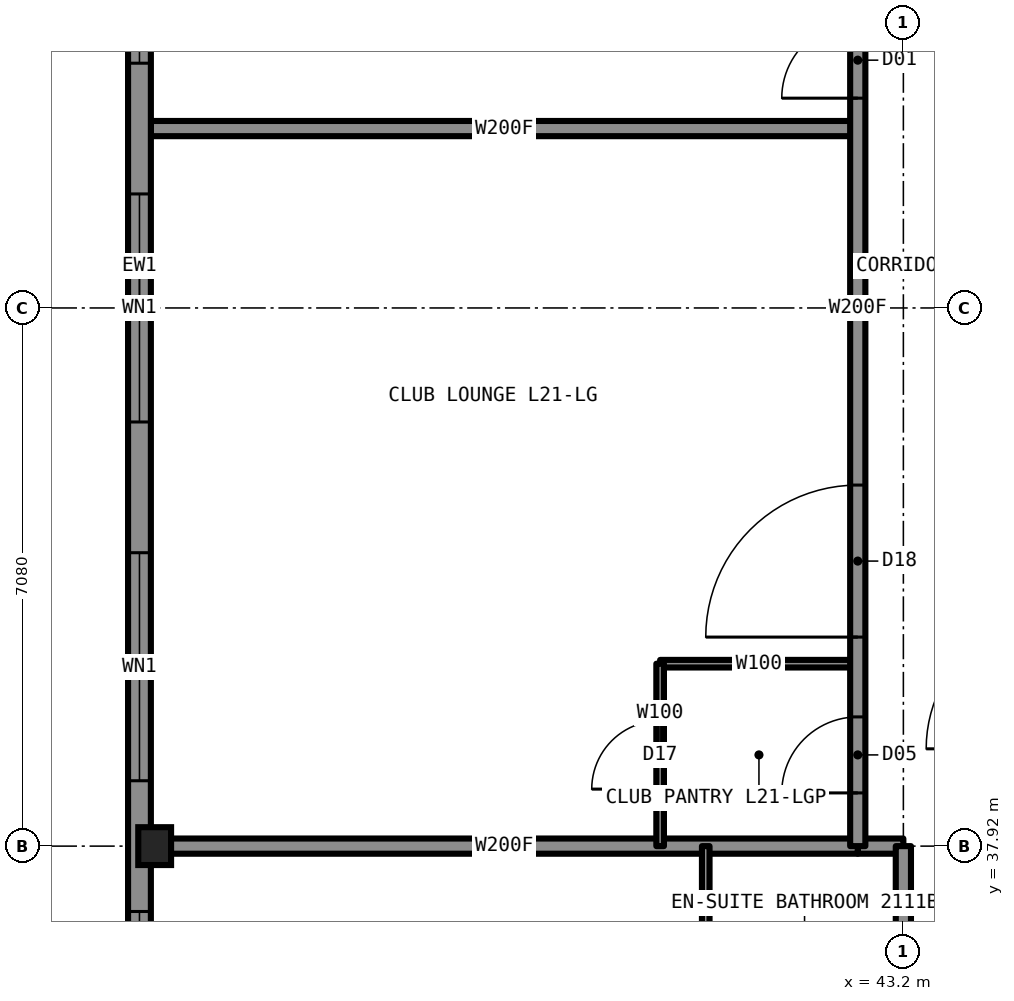
"""IFC4 building model, lengths in metres.
Left out: names, types, materials, properties, quantities, classifications, styles, units other than length and angle.
Written with IfcOpenShell. Run it as: python <this file> out.ifc"""

import sys

from ifc_helpers import new_model, si_unit, direction, frame, frame_2d, origin, origin_2d, place, context, subcontext, project, spatial, rectangle, i_section, extrude, element, fill, save


model = new_model("IFC4")
c1 = context("Model", 3, precision=1e-05, world=origin(), true_north=direction((0.0, 1.0)))
c2 = subcontext(c1, "Body", "Model", "MODEL_VIEW")
j1 = project(units=[si_unit("LENGTHUNIT", "METRE"), si_unit("PLANEANGLEUNIT", "RADIAN")], contexts=[c1])
p1 = place(None, origin())
s1 = spatial("IfcSite", under=j1, at=p1, CompositionType="ELEMENT")
p2 = place(p1, origin())
s2 = spatial("IfcBuilding", under=s1, at=p2, CompositionType="ELEMENT")
p3 = place(p2, frame((0.0, 0.0, 81.0)))
s3 = spatial("IfcBuildingStorey", under=s2, at=p3, CompositionType="ELEMENT", Elevation=81.0)
p4 = place(p3, frame((33.35, 37.92, 0.0), z_axis=(0.0, 0.0, 1.0), x_axis=(1.0, 0.0, 0.0)))
e1 = element("IfcColumn", 1, at=p4, inside=s3, PredefinedType="COLUMN", context=c2, shape_type="SweptSolid", body=[
    extrude(i_section(OverallWidth=0.432, OverallDepth=0.498, WebThickness=0.056, FlangeThickness=0.089, at=origin_2d()), origin(), (0.0, 0.0, 1.0), 3.5),
])
p5 = place(p3, frame((40.0, 40.32, 0.0), z_axis=(0.0, 0.0, 1.0), x_axis=(1.0, 0.0, 0.0)))
e2 = element("IfcWall", 2, at=p5, inside=s3, PredefinedType="PARTITIONING", context=c2, shape_type="SweptSolid", body=[
    extrude(rectangle(XDim=2.6, YDim=0.1, at=frame_2d((1.3, 0.0))), origin(), (0.0, 0.0, 1.0), 2.723),
])
p6 = place(p3, frame((42.6, 37.92, 0.0), z_axis=(0.0, 0.0, 1.0), x_axis=(1.0, 0.0, 0.0)))
e3 = element("IfcWall", 3, at=p6, inside=s3, PredefinedType="PARTITIONING", context=c2, shape_type="SweptSolid", body=[
    extrude(rectangle(XDim=0.6, YDim=0.2, at=frame_2d((0.3, 0.0))), origin(), (0.0, 0.0, 1.0), 2.573),
])
p7 = place(p3, frame((33.3, 37.92, 0.0), z_axis=(0.0, 0.0, 1.0), x_axis=(1.0, 0.0, 0.0)))
e4 = element("IfcWall", 4, at=p7, inside=s3, PredefinedType="PARTITIONING", context=c2, shape_type="SweptSolid", body=[
    extrude(rectangle(XDim=9.3, YDim=0.2, at=frame_2d((4.65, 0.0))), origin(), (0.0, 0.0, 1.0), 2.573),
])
p8 = place(p3, frame((33.3, 47.36, 0.0), z_axis=(0.0, 0.0, 1.0), x_axis=(1.0, 0.0, 0.0)))
e5 = element("IfcWall", 5, at=p8, inside=s3, PredefinedType="PARTITIONING", context=c2, shape_type="SweptSolid", body=[
    extrude(rectangle(XDim=9.3, YDim=0.2, at=frame_2d((4.65, 0.0))), origin(), (0.0, 0.0, 1.0), 2.723),
])
p9 = place(p3, frame((43.2, 33.2, 0.0), z_axis=(0.0, 0.0, 1.0), x_axis=(0.0, 1.0, 0.0)))
e6 = element("IfcWall", 6, at=p9, inside=s3, PredefinedType="PARTITIONING", context=c2, shape_type="SweptSolid", body=[
    extrude(rectangle(XDim=4.72, YDim=0.2, at=frame_2d((2.36, 0.0))), origin(), (0.0, 0.0, 1.0), 3.33),
])
p10 = place(p9, frame((0.66, 0.0, 0.0)))
e7 = element("IfcOpeningElement", 7, at=p10, cuts=e6, PredefinedType="OPENING", context=c2, shape_type="SweptSolid", body=[
    extrude(rectangle(XDim=1.1, YDim=2.2, at=frame_2d((0.55, 1.1))), frame((0.0, 0.11, 0.0), z_axis=(0.0, -1.0, 0.0), x_axis=(1.0, 0.0, 0.0)), (0.0, 0.0, 1.0), 0.22),
])
p11 = place(p3, frame((42.6, 37.92, 0.0), z_axis=(0.0, 0.0, 1.0), x_axis=(0.0, 1.0, 0.0)))
e8 = element("IfcWall", 8, at=p11, inside=s3, PredefinedType="PARTITIONING", context=c2, shape_type="SweptSolid", body=[
    extrude(rectangle(XDim=14.16, YDim=0.2, at=frame_2d((7.08, 0.0))), origin(), (0.0, 0.0, 1.0), 3.33),
])
p12 = place(p11, frame((9.84, 0.0, 0.0)))
e9 = element("IfcOpeningElement", 9, at=p12, cuts=e8, PredefinedType="OPENING", context=c2, shape_type="SweptSolid", body=[
    extrude(rectangle(XDim=1.0, YDim=2.2, at=frame_2d((0.5, 1.1))), frame((0.0, 0.11, 0.0), z_axis=(0.0, -1.0, 0.0), x_axis=(1.0, 0.0, 0.0)), (0.0, 0.0, 1.0), 0.22),
])
p13 = place(p11, frame((2.75, 0.0, 0.0)))
e10 = element("IfcOpeningElement", 10, at=p13, cuts=e8, PredefinedType="OPENING", context=c2, shape_type="SweptSolid", body=[
    extrude(rectangle(XDim=2.0, YDim=2.4, at=frame_2d((1.0, 1.2))), frame((0.0, 0.11, 0.0), z_axis=(0.0, -1.0, 0.0), x_axis=(1.0, 0.0, 0.0)), (0.0, 0.0, 1.0), 0.22),
])
p14 = place(p11, frame((0.7, 0.0, 0.0)))
e11 = element("IfcOpeningElement", 11, at=p14, cuts=e8, PredefinedType="OPENING", context=c2, shape_type="SweptSolid", body=[
    extrude(rectangle(XDim=1.0, YDim=2.1, at=frame_2d((0.5, 1.05))), frame((0.0, 0.11, 0.0), z_axis=(0.0, -1.0, 0.0), x_axis=(1.0, 0.0, 0.0)), (0.0, 0.0, 1.0), 0.22),
])
p15 = place(p3, frame((40.6, 35.32, 0.0), z_axis=(0.0, 0.0, 1.0), x_axis=(0.0, 1.0, 0.0)))
e12 = element("IfcWall", 12, at=p15, inside=s3, PredefinedType="PARTITIONING", context=c2, shape_type="SweptSolid", body=[
    extrude(rectangle(XDim=2.6, YDim=0.1, at=frame_2d((1.3, 0.0))), origin(), (0.0, 0.0, 1.0), 3.33),
])
p16 = place(p3, frame((40.0, 37.92, 0.0), z_axis=(0.0, 0.0, 1.0), x_axis=(0.0, 1.0, 0.0)))
e13 = element("IfcWall", 13, at=p16, inside=s3, PredefinedType="PARTITIONING", context=c2, shape_type="SweptSolid", body=[
    extrude(rectangle(XDim=2.4, YDim=0.1, at=frame_2d((1.2, 0.0))), origin(), (0.0, 0.0, 1.0), 3.33),
])
p17 = place(p16, frame((0.75, 0.0, 0.0)))
e14 = element("IfcOpeningElement", 14, at=p17, cuts=e13, PredefinedType="OPENING", context=c2, shape_type="SweptSolid", body=[
    extrude(rectangle(XDim=0.9, YDim=2.2, at=frame_2d((0.45, 1.1))), frame((0.0, 0.06, 0.0), z_axis=(0.0, -1.0, 0.0), x_axis=(1.0, 0.0, 0.0)), (0.0, 0.0, 1.0), 0.12),
])
p18 = place(p3, frame((33.15, 61.5, 0.0), z_axis=(0.0, 0.0, 1.0), x_axis=(0.0, -1.0, 0.0)))
e15 = element("IfcWall", 15, at=p18, inside=s3, PredefinedType="SOLIDWALL", context=c2, shape_type="SweptSolid", body=[
    extrude(rectangle(XDim=33.0, YDim=0.3, at=frame_2d((16.5, 0.0))), origin(), (0.0, 0.0, 1.0), 2.63),
])
p19 = place(p18, frame((0.85, 0.0, 0.5)))
e16 = element("IfcOpeningElement", 16, at=p19, cuts=e15, PredefinedType="OPENING", context=c2, shape_type="SweptSolid", body=[
    extrude(rectangle(XDim=3.0, YDim=2.0, at=frame_2d((1.5, 1.0))), frame((0.0, 0.16, 0.0), z_axis=(0.0, -1.0, 0.0), x_axis=(1.0, 0.0, 0.0)), (0.0, 0.0, 1.0), 0.32),
])
p20 = place(p18, frame((5.56, 0.0, 0.5)))
e17 = element("IfcOpeningElement", 17, at=p20, cuts=e15, PredefinedType="OPENING", context=c2, shape_type="SweptSolid", body=[
    extrude(rectangle(XDim=3.0, YDim=2.0, at=frame_2d((1.5, 1.0))), frame((0.0, 0.16, 0.0), z_axis=(0.0, -1.0, 0.0), x_axis=(1.0, 0.0, 0.0)), (0.0, 0.0, 1.0), 0.32),
])
p21 = place(p18, frame((10.28, 0.0, 0.5)))
e18 = element("IfcOpeningElement", 18, at=p21, cuts=e15, PredefinedType="OPENING", context=c2, shape_type="SweptSolid", body=[
    extrude(rectangle(XDim=3.0, YDim=2.0, at=frame_2d((1.5, 1.0))), frame((0.0, 0.16, 0.0), z_axis=(0.0, -1.0, 0.0), x_axis=(1.0, 0.0, 0.0)), (0.0, 0.0, 1.0), 0.32),
])
p22 = place(p18, frame((15.0, 0.0, 0.5)))
e19 = element("IfcOpeningElement", 19, at=p22, cuts=e15, PredefinedType="OPENING", context=c2, shape_type="SweptSolid", body=[
    extrude(rectangle(XDim=3.0, YDim=2.0, at=frame_2d((1.5, 1.0))), frame((0.0, 0.16, 0.0), z_axis=(0.0, -1.0, 0.0), x_axis=(1.0, 0.0, 0.0)), (0.0, 0.0, 1.0), 0.32),
])
p23 = place(p18, frame((19.72, 0.0, 0.5)))
e20 = element("IfcOpeningElement", 20, at=p23, cuts=e15, PredefinedType="OPENING", context=c2, shape_type="SweptSolid", body=[
    extrude(rectangle(XDim=3.0, YDim=2.0, at=frame_2d((1.5, 1.0))), frame((0.0, 0.16, 0.0), z_axis=(0.0, -1.0, 0.0), x_axis=(1.0, 0.0, 0.0)), (0.0, 0.0, 1.0), 0.32),
])
p24 = place(p18, frame((24.44, 0.0, 0.5)))
e21 = element("IfcOpeningElement", 21, at=p24, cuts=e15, PredefinedType="OPENING", context=c2, shape_type="SweptSolid", body=[
    extrude(rectangle(XDim=3.0, YDim=2.0, at=frame_2d((1.5, 1.0))), frame((0.0, 0.16, 0.0), z_axis=(0.0, -1.0, 0.0), x_axis=(1.0, 0.0, 0.0)), (0.0, 0.0, 1.0), 0.32),
])
p25 = place(p18, frame((29.15, 0.0, 0.5)))
e22 = element("IfcOpeningElement", 22, at=p25, cuts=e15, PredefinedType="OPENING", context=c2, shape_type="SweptSolid", body=[
    extrude(rectangle(XDim=3.0, YDim=2.0, at=frame_2d((1.5, 1.0))), frame((0.0, 0.16, 0.0), z_axis=(0.0, -1.0, 0.0), x_axis=(1.0, 0.0, 0.0)), (0.0, 0.0, 1.0), 0.32),
])
p26 = place(p12, origin())
e23 = element("IfcDoor", 23, at=p26, inside=s3, OperationType="SINGLE_SWING_LEFT", PredefinedType="DOOR", context=c2, shape_type="SweptSolid", body=[
    extrude(rectangle(XDim=1.0, YDim=2.2, at=frame_2d((0.5, 1.1))), frame((0.0, 0.025, 0.0), z_axis=(0.0, -1.0, 0.0), x_axis=(1.0, 0.0, 0.0)), (0.0, 0.0, 1.0), 0.05),
])
fill(e9, e23)
p27 = place(p13, origin())
e24 = element("IfcDoor", 24, at=p27, inside=s3, OperationType="DOUBLE_DOOR_SINGLE_SWING", PredefinedType="DOOR", context=c2, shape_type="SweptSolid", body=[
    extrude(rectangle(XDim=2.0, YDim=2.4, at=frame_2d((1.0, 1.2))), frame((0.0, 0.025, 0.0), z_axis=(0.0, -1.0, 0.0), x_axis=(1.0, 0.0, 0.0)), (0.0, 0.0, 1.0), 0.05),
])
fill(e10, e24)
p28 = place(p17, origin())
e25 = element("IfcDoor", 25, at=p28, inside=s3, OperationType="SINGLE_SWING_LEFT", PredefinedType="DOOR", context=c2, shape_type="SweptSolid", body=[
    extrude(rectangle(XDim=0.9, YDim=2.2, at=frame_2d((0.45, 1.1))), frame((0.0, 0.025, 0.0), z_axis=(0.0, -1.0, 0.0), x_axis=(1.0, 0.0, 0.0)), (0.0, 0.0, 1.0), 0.05),
])
fill(e14, e25)
p29 = place(p14, origin())
e26 = element("IfcDoor", 26, at=p29, inside=s3, OperationType="SINGLE_SWING_LEFT", PredefinedType="DOOR", context=c2, shape_type="SweptSolid", body=[
    extrude(rectangle(XDim=1.0, YDim=2.1, at=frame_2d((0.5, 1.05))), frame((0.0, 0.025, 0.0), z_axis=(0.0, -1.0, 0.0), x_axis=(1.0, 0.0, 0.0)), (0.0, 0.0, 1.0), 0.05),
])
fill(e11, e26)
p30 = place(p21, origin())
e27 = element("IfcWindow", 27, at=p30, inside=s3, PartitioningType="SINGLE_PANEL", PredefinedType="WINDOW", context=c2, shape_type="SweptSolid", body=[
    extrude(rectangle(XDim=3.0, YDim=2.0, at=frame_2d((1.5, 1.0))), frame((0.0, 0.03, 0.0), z_axis=(0.0, -1.0, 0.0), x_axis=(1.0, 0.0, 0.0)), (0.0, 0.0, 1.0), 0.06),
])
fill(e18, e27)
p31 = place(p22, origin())
e28 = element("IfcWindow", 28, at=p31, inside=s3, PartitioningType="SINGLE_PANEL", PredefinedType="WINDOW", context=c2, shape_type="SweptSolid", body=[
    extrude(rectangle(XDim=3.0, YDim=2.0, at=frame_2d((1.5, 1.0))), frame((0.0, 0.03, 0.0), z_axis=(0.0, -1.0, 0.0), x_axis=(1.0, 0.0, 0.0)), (0.0, 0.0, 1.0), 0.06),
])
fill(e19, e28)
p32 = place(p23, origin())
e29 = element("IfcWindow", 29, at=p32, inside=s3, PartitioningType="SINGLE_PANEL", PredefinedType="WINDOW", context=c2, shape_type="SweptSolid", body=[
    extrude(rectangle(XDim=3.0, YDim=2.0, at=frame_2d((1.5, 1.0))), frame((0.0, 0.03, 0.0), z_axis=(0.0, -1.0, 0.0), x_axis=(1.0, 0.0, 0.0)), (0.0, 0.0, 1.0), 0.06),
])
fill(e20, e29)
p33 = place(p24, origin())
e30 = element("IfcWindow", 30, at=p33, inside=s3, PartitioningType="SINGLE_PANEL", PredefinedType="WINDOW", context=c2, shape_type="SweptSolid", body=[
    extrude(rectangle(XDim=3.0, YDim=2.0, at=frame_2d((1.5, 1.0))), frame((0.0, 0.03, 0.0), z_axis=(0.0, -1.0, 0.0), x_axis=(1.0, 0.0, 0.0)), (0.0, 0.0, 1.0), 0.06),
])
fill(e21, e30)
save(model, sys.argv[1])
